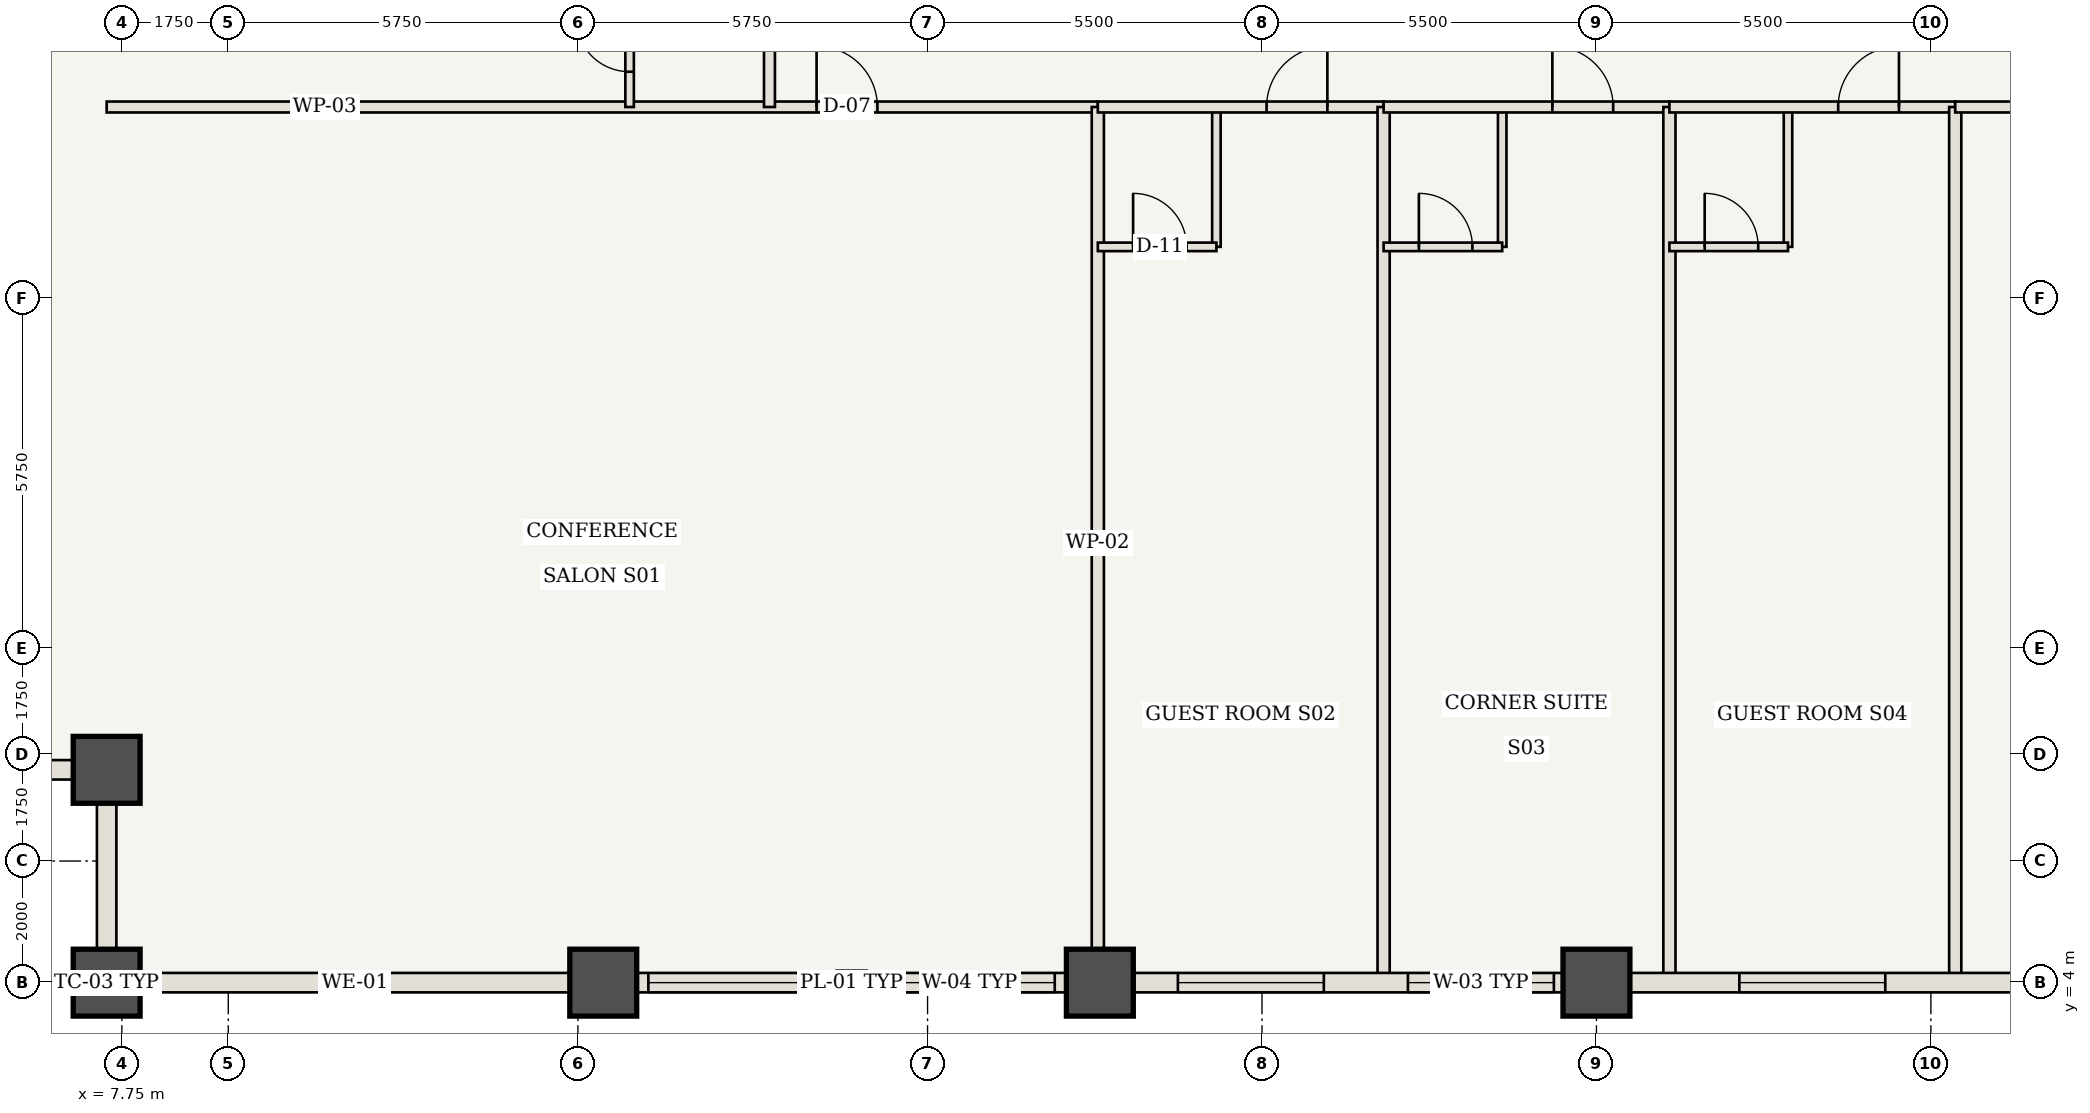
"""IFC4 building model, lengths in metres.
Left out: names, types, materials, properties, quantities, classifications, styles, units other than length and angle.
Written with IfcOpenShell. Run it as: python <this file> out.ifc"""

import sys

from ifc_helpers import new_model, si_unit, direction, frame, frame_2d, origin, origin_2d, place, context, subcontext, project, spatial, rectangle, extrude, element, fill, save


model = new_model("IFC4")
c1 = context("Model", 3, precision=1e-05, world=origin(), true_north=direction((0.0, 1.0)))
c2 = subcontext(c1, "Body", "Model", "MODEL_VIEW")
j1 = project(units=[si_unit("LENGTHUNIT", "METRE"), si_unit("PLANEANGLEUNIT", "RADIAN")], contexts=[c1])
p1 = place(None, origin())
s1 = spatial("IfcSite", under=j1, at=p1, CompositionType="ELEMENT")
p2 = place(p1, origin())
s2 = spatial("IfcBuilding", under=s1, at=p2, CompositionType="ELEMENT")
p3 = place(p2, frame((0.0, 0.0, 45.85)))
s3 = spatial("IfcBuildingStorey", under=s2, at=p3, CompositionType="ELEMENT", Elevation=45.85)
for number, where, z_axis, x_axis in (
    (1, (7.5, 4.0, 0.0), (0.0, 0.0, 1.0), (1.0, 0.0, 0.0)),
    (2, (7.5, 7.5, 0.0), (0.0, 0.0, 1.0), (1.0, 0.0, 0.0)),
    (3, (15.667, 4.0, 0.0), (0.0, 0.0, 1.0), (1.0, 0.0, 0.0)),
    (4, (23.833, 4.0, 0.0), (0.0, 0.0, 1.0), (1.0, 0.0, 0.0)),
    (5, (32.0, 4.0, 0.0), (0.0, 0.0, 1.0), (1.0, 0.0, 0.0)),
):
    element("IfcColumn", number, at=place(p3, frame(where, z_axis=z_axis, x_axis=x_axis)), inside=s3, PredefinedType="COLUMN", context=c2, shape_type="SweptSolid", body=[
        extrude(rectangle(XDim=1.1, YDim=1.1, at=origin_2d()), origin(), (0.0, 0.0, 1.0), 3.5),
    ])
p4 = place(p3, frame((7.5, 18.4, 0.0), z_axis=(0.0, 0.0, 1.0), x_axis=(1.0, 0.0, 0.0)))
e6 = element("IfcWall", 6, at=p4, inside=s3, PredefinedType="STANDARD", context=c2, shape_type="SweptSolid", body=[
    extrude(rectangle(XDim=16.3, YDim=0.18, at=frame_2d((8.15, 0.0))), origin(), (0.0, 0.0, 1.0), 3.32),
])
p5 = place(p4, frame((11.675, 0.0, 0.0)))
e7 = element("IfcOpeningElement", 7, at=p5, cuts=e6, PredefinedType="OPENING", context=c2, shape_type="SweptSolid", body=[
    extrude(rectangle(XDim=1.0, YDim=2.15, at=frame_2d((0.5, 1.075))), frame((0.0, 0.1, 0.0), z_axis=(0.0, -1.0, 0.0), x_axis=(1.0, 0.0, 0.0)), (0.0, 0.0, 1.0), 0.2),
])
p6 = place(p3, frame((23.8, 4.06, 0.0), z_axis=(0.0, 0.0, 1.0), x_axis=(0.0, 1.0, 0.0)))
e8 = element("IfcWall", 8, at=p6, inside=s3, PredefinedType="STANDARD", context=c2, shape_type="SweptSolid", body=[
    extrude(rectangle(XDim=14.34, YDim=0.2, at=frame_2d((7.17, 0.0))), origin(), (0.0, 0.0, 1.0), 3.32),
])
p7 = place(p3, frame((25.75, 16.1, 0.0), z_axis=(0.0, 0.0, 1.0), x_axis=(0.0, 1.0, 0.0)))
e9 = element("IfcWall", 9, at=p7, inside=s3, PredefinedType="STANDARD", context=c2, shape_type="SweptSolid", body=[
    extrude(rectangle(XDim=2.3, YDim=0.14, at=frame_2d((1.15, 0.0))), origin(), (0.0, 0.0, 1.0), 3.32),
])
p8 = place(p3, frame((23.8, 16.1, 0.0), z_axis=(0.0, 0.0, 1.0), x_axis=(1.0, 0.0, 0.0)))
e10 = element("IfcWall", 10, at=p8, inside=s3, PredefinedType="STANDARD", context=c2, shape_type="SweptSolid", body=[
    extrude(rectangle(XDim=1.95, YDim=0.14, at=frame_2d((0.975, 0.0))), origin(), (0.0, 0.0, 1.0), 3.32),
])
p9 = place(p8, frame((0.58, 0.0, 0.0)))
e11 = element("IfcOpeningElement", 11, at=p9, cuts=e10, PredefinedType="OPENING", context=c2, shape_type="SweptSolid", body=[
    extrude(rectangle(XDim=0.88, YDim=2.1, at=frame_2d((0.44, 1.05))), frame((0.0, 0.08, 0.0), z_axis=(0.0, -1.0, 0.0), x_axis=(1.0, 0.0, 0.0)), (0.0, 0.0, 1.0), 0.16),
])
p10 = place(p3, frame((23.8, 18.4, 0.0), z_axis=(0.0, 0.0, 1.0), x_axis=(1.0, 0.0, 0.0)))
e12 = element("IfcWall", 12, at=p10, inside=s3, PredefinedType="STANDARD", context=c2, shape_type="SweptSolid", body=[
    extrude(rectangle(XDim=4.7, YDim=0.18, at=frame_2d((2.35, 0.0))), origin(), (0.0, 0.0, 1.0), 3.32),
])
p11 = place(p10, frame((2.775, 0.0, 0.0)))
e13 = element("IfcOpeningElement", 13, at=p11, cuts=e12, PredefinedType="OPENING", context=c2, shape_type="SweptSolid", body=[
    extrude(rectangle(XDim=1.0, YDim=2.15, at=frame_2d((0.5, 1.075))), frame((0.0, 0.1, 0.0), z_axis=(0.0, -1.0, 0.0), x_axis=(1.0, 0.0, 0.0)), (0.0, 0.0, 1.0), 0.2),
])
p12 = place(p3, frame((28.5, 4.06, 0.0), z_axis=(0.0, 0.0, 1.0), x_axis=(0.0, 1.0, 0.0)))
e14 = element("IfcWall", 14, at=p12, inside=s3, PredefinedType="STANDARD", context=c2, shape_type="SweptSolid", body=[
    extrude(rectangle(XDim=14.34, YDim=0.2, at=frame_2d((7.17, 0.0))), origin(), (0.0, 0.0, 1.0), 3.32),
])
p13 = place(p3, frame((30.45, 16.1, 0.0), z_axis=(0.0, 0.0, 1.0), x_axis=(0.0, 1.0, 0.0)))
e15 = element("IfcWall", 15, at=p13, inside=s3, PredefinedType="STANDARD", context=c2, shape_type="SweptSolid", body=[
    extrude(rectangle(XDim=2.3, YDim=0.14, at=frame_2d((1.15, 0.0))), origin(), (0.0, 0.0, 1.0), 3.32),
])
p14 = place(p3, frame((28.5, 16.1, 0.0), z_axis=(0.0, 0.0, 1.0), x_axis=(1.0, 0.0, 0.0)))
e16 = element("IfcWall", 16, at=p14, inside=s3, PredefinedType="STANDARD", context=c2, shape_type="SweptSolid", body=[
    extrude(rectangle(XDim=1.95, YDim=0.14, at=frame_2d((0.975, 0.0))), origin(), (0.0, 0.0, 1.0), 3.32),
])
p15 = place(p14, frame((0.58, 0.0, 0.0)))
e17 = element("IfcOpeningElement", 17, at=p15, cuts=e16, PredefinedType="OPENING", context=c2, shape_type="SweptSolid", body=[
    extrude(rectangle(XDim=0.88, YDim=2.1, at=frame_2d((0.44, 1.05))), frame((0.0, 0.08, 0.0), z_axis=(0.0, -1.0, 0.0), x_axis=(1.0, 0.0, 0.0)), (0.0, 0.0, 1.0), 0.16),
])
p16 = place(p3, frame((28.5, 18.4, 0.0), z_axis=(0.0, 0.0, 1.0), x_axis=(1.0, 0.0, 0.0)))
e18 = element("IfcWall", 18, at=p16, inside=s3, PredefinedType="STANDARD", context=c2, shape_type="SweptSolid", body=[
    extrude(rectangle(XDim=4.7, YDim=0.18, at=frame_2d((2.35, 0.0))), origin(), (0.0, 0.0, 1.0), 3.32),
])
p17 = place(p16, frame((2.775, 0.0, 0.0)))
e19 = element("IfcOpeningElement", 19, at=p17, cuts=e18, PredefinedType="OPENING", context=c2, shape_type="SweptSolid", body=[
    extrude(rectangle(XDim=1.0, YDim=2.15, at=frame_2d((0.5, 1.075))), frame((0.0, 0.1, 0.0), z_axis=(0.0, -1.0, 0.0), x_axis=(1.0, 0.0, 0.0)), (0.0, 0.0, 1.0), 0.2),
])
p18 = place(p3, frame((33.2, 4.06, 0.0), z_axis=(0.0, 0.0, 1.0), x_axis=(0.0, 1.0, 0.0)))
e20 = element("IfcWall", 20, at=p18, inside=s3, PredefinedType="STANDARD", context=c2, shape_type="SweptSolid", body=[
    extrude(rectangle(XDim=14.34, YDim=0.2, at=frame_2d((7.17, 0.0))), origin(), (0.0, 0.0, 1.0), 3.32),
])
p19 = place(p3, frame((35.15, 16.1, 0.0), z_axis=(0.0, 0.0, 1.0), x_axis=(0.0, 1.0, 0.0)))
e21 = element("IfcWall", 21, at=p19, inside=s3, PredefinedType="STANDARD", context=c2, shape_type="SweptSolid", body=[
    extrude(rectangle(XDim=2.3, YDim=0.14, at=frame_2d((1.15, 0.0))), origin(), (0.0, 0.0, 1.0), 3.32),
])
p20 = place(p3, frame((33.2, 16.1, 0.0), z_axis=(0.0, 0.0, 1.0), x_axis=(1.0, 0.0, 0.0)))
e22 = element("IfcWall", 22, at=p20, inside=s3, PredefinedType="STANDARD", context=c2, shape_type="SweptSolid", body=[
    extrude(rectangle(XDim=1.95, YDim=0.14, at=frame_2d((0.975, 0.0))), origin(), (0.0, 0.0, 1.0), 3.32),
])
p21 = place(p20, frame((0.58, 0.0, 0.0)))
e23 = element("IfcOpeningElement", 23, at=p21, cuts=e22, PredefinedType="OPENING", context=c2, shape_type="SweptSolid", body=[
    extrude(rectangle(XDim=0.88, YDim=2.1, at=frame_2d((0.44, 1.05))), frame((0.0, 0.08, 0.0), z_axis=(0.0, -1.0, 0.0), x_axis=(1.0, 0.0, 0.0)), (0.0, 0.0, 1.0), 0.16),
])
p22 = place(p3, frame((33.2, 18.4, 0.0), z_axis=(0.0, 0.0, 1.0), x_axis=(1.0, 0.0, 0.0)))
e24 = element("IfcWall", 24, at=p22, inside=s3, PredefinedType="STANDARD", context=c2, shape_type="SweptSolid", body=[
    extrude(rectangle(XDim=4.7, YDim=0.18, at=frame_2d((2.35, 0.0))), origin(), (0.0, 0.0, 1.0), 3.32),
])
p23 = place(p22, frame((2.775, 0.0, 0.0)))
e25 = element("IfcOpeningElement", 25, at=p23, cuts=e24, PredefinedType="OPENING", context=c2, shape_type="SweptSolid", body=[
    extrude(rectangle(XDim=1.0, YDim=2.15, at=frame_2d((0.5, 1.075))), frame((0.0, 0.1, 0.0), z_axis=(0.0, -1.0, 0.0), x_axis=(1.0, 0.0, 0.0)), (0.0, 0.0, 1.0), 0.2),
])
p24 = place(p3, frame((37.9, 4.06, 0.0), z_axis=(0.0, 0.0, 1.0), x_axis=(0.0, 1.0, 0.0)))
e26 = element("IfcWall", 26, at=p24, inside=s3, PredefinedType="STANDARD", context=c2, shape_type="SweptSolid", body=[
    extrude(rectangle(XDim=14.34, YDim=0.2, at=frame_2d((7.17, 0.0))), origin(), (0.0, 0.0, 1.0), 3.32),
])
p25 = place(p3, frame((37.9, 18.4, 0.0), z_axis=(0.0, 0.0, 1.0), x_axis=(1.0, 0.0, 0.0)))
e27 = element("IfcWall", 27, at=p25, inside=s3, PredefinedType="STANDARD", context=c2, shape_type="SweptSolid", body=[
    extrude(rectangle(XDim=18.6, YDim=0.18, at=frame_2d((9.3, 0.0))), origin(), (0.0, 0.0, 1.0), 3.32),
])
p26 = place(p25, frame((4.775, 0.0, 0.0)))
e28 = element("IfcOpeningElement", 28, at=p26, cuts=e27, PredefinedType="OPENING", context=c2, shape_type="SweptSolid", body=[
    extrude(rectangle(XDim=1.0, YDim=2.15, at=frame_2d((0.5, 1.075))), frame((0.0, 0.1, 0.0), z_axis=(0.0, -1.0, 0.0), x_axis=(1.0, 0.0, 0.0)), (0.0, 0.0, 1.0), 0.2),
])
p27 = place(p3, frame((16.1, 18.4, 0.0), z_axis=(0.0, 0.0, 1.0), x_axis=(0.0, 1.0, 0.0)))
e29 = element("IfcWall", 29, at=p27, inside=s3, PredefinedType="STANDARD", context=c2, shape_type="SweptSolid", body=[
    extrude(rectangle(XDim=1.95, YDim=0.14, at=frame_2d((0.975, 0.0))), origin(), (0.0, 0.0, 1.0), 3.32),
])
p28 = place(p27, frame((0.58, 0.0, 0.0)))
e30 = element("IfcOpeningElement", 30, at=p28, cuts=e29, PredefinedType="OPENING", context=c2, shape_type="SweptSolid", body=[
    extrude(rectangle(XDim=0.88, YDim=2.1, at=frame_2d((0.44, 1.05))), frame((0.0, 0.08, 0.0), z_axis=(0.0, -1.0, 0.0), x_axis=(1.0, 0.0, 0.0)), (0.0, 0.0, 1.0), 0.16),
])
p29 = place(p3, frame((18.4, 18.4, 0.0), z_axis=(0.0, 0.0, 1.0), x_axis=(0.0, 1.0, 0.0)))
e31 = element("IfcWall", 31, at=p29, inside=s3, PredefinedType="STANDARD", context=c2, shape_type="SweptSolid", body=[
    extrude(rectangle(XDim=4.8, YDim=0.18, at=frame_2d((2.4, 0.0))), origin(), (0.0, 0.0, 1.0), 3.32),
])
p30 = place(p29, frame((2.825, 0.0, 0.0)))
e32 = element("IfcOpeningElement", 32, at=p30, cuts=e31, PredefinedType="OPENING", context=c2, shape_type="SweptSolid", body=[
    extrude(rectangle(XDim=1.0, YDim=2.15, at=frame_2d((0.5, 1.075))), frame((0.0, 0.1, 0.0), z_axis=(0.0, -1.0, 0.0), x_axis=(1.0, 0.0, 0.0)), (0.0, 0.0, 1.0), 0.2),
])
p31 = place(p3, frame((15.667, 4.0, 0.0), z_axis=(0.0, 0.0, 1.0), x_axis=(-1.0, 0.0, 0.0)))
e33 = element("IfcWall", 33, at=p31, inside=s3, PredefinedType="USERDEFINED", context=c2, shape_type="SweptSolid", body=[
    extrude(rectangle(XDim=8.167, YDim=0.32, at=frame_2d((4.083, 0.0))), origin(), (0.0, 0.0, 1.0), 2.52),
])
p32 = place(p3, frame((23.833, 4.0, 0.0), z_axis=(0.0, 0.0, 1.0), x_axis=(-1.0, 0.0, 0.0)))
e34 = element("IfcWall", 34, at=p32, inside=s3, PredefinedType="USERDEFINED", context=c2, shape_type="SweptSolid", body=[
    extrude(rectangle(XDim=8.167, YDim=0.32, at=frame_2d((4.083, 0.0))), origin(), (0.0, 0.0, 1.0), 2.52),
])
p33 = place(p32, frame((0.742, 0.0, 0.85)))
e35 = element("IfcOpeningElement", 35, at=p33, cuts=e34, PredefinedType="OPENING", context=c2, shape_type="SweptSolid", body=[
    extrude(rectangle(XDim=2.8, YDim=1.47, at=frame_2d((1.4, 0.735))), frame((0.0, 0.17, 0.0), z_axis=(0.0, -1.0, 0.0), x_axis=(1.0, 0.0, 0.0)), (0.0, 0.0, 1.0), 0.34),
])
p34 = place(p32, frame((4.625, 0.0, 0.85)))
e36 = element("IfcOpeningElement", 36, at=p34, cuts=e34, PredefinedType="OPENING", context=c2, shape_type="SweptSolid", body=[
    extrude(rectangle(XDim=2.8, YDim=1.47, at=frame_2d((1.4, 0.735))), frame((0.0, 0.17, 0.0), z_axis=(0.0, -1.0, 0.0), x_axis=(1.0, 0.0, 0.0)), (0.0, 0.0, 1.0), 0.34),
])
p35 = place(p3, frame((32.0, 4.0, 0.0), z_axis=(0.0, 0.0, 1.0), x_axis=(-1.0, 0.0, 0.0)))
e37 = element("IfcWall", 37, at=p35, inside=s3, PredefinedType="USERDEFINED", context=c2, shape_type="SweptSolid", body=[
    extrude(rectangle(XDim=8.167, YDim=0.32, at=frame_2d((4.083, 0.0))), origin(), (0.0, 0.0, 1.0), 2.52),
])
p36 = place(p35, frame((0.7, 0.0, 0.85)))
e38 = element("IfcOpeningElement", 38, at=p36, cuts=e37, PredefinedType="OPENING", context=c2, shape_type="SweptSolid", body=[
    extrude(rectangle(XDim=2.4, YDim=1.47, at=frame_2d((1.2, 0.735))), frame((0.0, 0.17, 0.0), z_axis=(0.0, -1.0, 0.0), x_axis=(1.0, 0.0, 0.0)), (0.0, 0.0, 1.0), 0.34),
])
p37 = place(p35, frame((4.483, 0.0, 0.85)))
e39 = element("IfcOpeningElement", 39, at=p37, cuts=e37, PredefinedType="OPENING", context=c2, shape_type="SweptSolid", body=[
    extrude(rectangle(XDim=2.4, YDim=1.47, at=frame_2d((1.2, 0.735))), frame((0.0, 0.17, 0.0), z_axis=(0.0, -1.0, 0.0), x_axis=(1.0, 0.0, 0.0)), (0.0, 0.0, 1.0), 0.34),
])
p38 = place(p3, frame((40.167, 4.0, 0.0), z_axis=(0.0, 0.0, 1.0), x_axis=(-1.0, 0.0, 0.0)))
e40 = element("IfcWall", 40, at=p38, inside=s3, PredefinedType="USERDEFINED", context=c2, shape_type="SweptSolid", body=[
    extrude(rectangle(XDim=8.167, YDim=0.32, at=frame_2d((4.083, 0.0))), origin(), (0.0, 0.0, 1.0), 2.52),
])
p39 = place(p38, frame((3.417, 0.0, 0.85)))
e41 = element("IfcOpeningElement", 41, at=p39, cuts=e40, PredefinedType="OPENING", context=c2, shape_type="SweptSolid", body=[
    extrude(rectangle(XDim=2.4, YDim=1.47, at=frame_2d((1.2, 0.735))), frame((0.0, 0.17, 0.0), z_axis=(0.0, -1.0, 0.0), x_axis=(1.0, 0.0, 0.0)), (0.0, 0.0, 1.0), 0.34),
])
for number, where, z_axis, x_axis in (
    (42, (7.5, 4.0, 0.0), (0.0, 0.0, 1.0), (0.0, 1.0, 0.0)),
    (43, (7.5, 7.5, 0.0), (0.0, 0.0, 1.0), (-1.0, 0.0, 0.0)),
):
    element("IfcWall", number, at=place(p3, frame(where, z_axis=z_axis, x_axis=x_axis)), inside=s3, PredefinedType="USERDEFINED", context=c2, shape_type="SweptSolid", body=[
        extrude(rectangle(XDim=3.5, YDim=0.32, at=frame_2d((1.75, 0.0))), origin(), (0.0, 0.0, 1.0), 2.52),
    ])
p40 = place(p5, origin())
e44 = element("IfcDoor", 44, at=p40, inside=s3, OperationType="SINGLE_SWING_LEFT", PredefinedType="DOOR", context=c2, shape_type="SweptSolid", body=[
    extrude(rectangle(XDim=1.0, YDim=2.15, at=frame_2d((0.5, 1.075))), frame((0.0, 0.025, 0.0), z_axis=(0.0, -1.0, 0.0), x_axis=(1.0, 0.0, 0.0)), (0.0, 0.0, 1.0), 0.05),
])
fill(e7, e44)
p41 = place(p9, origin())
e45 = element("IfcDoor", 45, at=p41, inside=s3, OperationType="SINGLE_SWING_LEFT", PredefinedType="DOOR", context=c2, shape_type="SweptSolid", body=[
    extrude(rectangle(XDim=0.88, YDim=2.1, at=frame_2d((0.44, 1.05))), frame((0.0, 0.025, 0.0), z_axis=(0.0, -1.0, 0.0), x_axis=(1.0, 0.0, 0.0)), (0.0, 0.0, 1.0), 0.05),
])
fill(e11, e45)
p42 = place(p11, origin())
e46 = element("IfcDoor", 46, at=p42, inside=s3, OperationType="SINGLE_SWING_RIGHT", PredefinedType="DOOR", context=c2, shape_type="SweptSolid", body=[
    extrude(rectangle(XDim=1.0, YDim=2.15, at=frame_2d((0.5, 1.075))), frame((0.0, 0.025, 0.0), z_axis=(0.0, -1.0, 0.0), x_axis=(1.0, 0.0, 0.0)), (0.0, 0.0, 1.0), 0.05),
])
fill(e13, e46)
p43 = place(p15, origin())
e47 = element("IfcDoor", 47, at=p43, inside=s3, OperationType="SINGLE_SWING_LEFT", PredefinedType="DOOR", context=c2, shape_type="SweptSolid", body=[
    extrude(rectangle(XDim=0.88, YDim=2.1, at=frame_2d((0.44, 1.05))), frame((0.0, 0.025, 0.0), z_axis=(0.0, -1.0, 0.0), x_axis=(1.0, 0.0, 0.0)), (0.0, 0.0, 1.0), 0.05),
])
fill(e17, e47)
p44 = place(p17, origin())
e48 = element("IfcDoor", 48, at=p44, inside=s3, OperationType="SINGLE_SWING_LEFT", PredefinedType="DOOR", context=c2, shape_type="SweptSolid", body=[
    extrude(rectangle(XDim=1.0, YDim=2.15, at=frame_2d((0.5, 1.075))), frame((0.0, 0.025, 0.0), z_axis=(0.0, -1.0, 0.0), x_axis=(1.0, 0.0, 0.0)), (0.0, 0.0, 1.0), 0.05),
])
fill(e19, e48)
p45 = place(p21, origin())
e49 = element("IfcDoor", 49, at=p45, inside=s3, OperationType="SINGLE_SWING_LEFT", PredefinedType="DOOR", context=c2, shape_type="SweptSolid", body=[
    extrude(rectangle(XDim=0.88, YDim=2.1, at=frame_2d((0.44, 1.05))), frame((0.0, 0.025, 0.0), z_axis=(0.0, -1.0, 0.0), x_axis=(1.0, 0.0, 0.0)), (0.0, 0.0, 1.0), 0.05),
])
fill(e23, e49)
p46 = place(p23, origin())
e50 = element("IfcDoor", 50, at=p46, inside=s3, OperationType="SINGLE_SWING_RIGHT", PredefinedType="DOOR", context=c2, shape_type="SweptSolid", body=[
    extrude(rectangle(XDim=1.0, YDim=2.15, at=frame_2d((0.5, 1.075))), frame((0.0, 0.025, 0.0), z_axis=(0.0, -1.0, 0.0), x_axis=(1.0, 0.0, 0.0)), (0.0, 0.0, 1.0), 0.05),
])
fill(e25, e50)
p47 = place(p28, origin())
e51 = element("IfcDoor", 51, at=p47, inside=s3, OperationType="SINGLE_SWING_RIGHT", PredefinedType="DOOR", context=c2, shape_type="SweptSolid", body=[
    extrude(rectangle(XDim=0.88, YDim=2.1, at=frame_2d((0.44, 1.05))), frame((0.0, 0.025, 0.0), z_axis=(0.0, -1.0, 0.0), x_axis=(1.0, 0.0, 0.0)), (0.0, 0.0, 1.0), 0.05),
])
fill(e30, e51)
p48 = place(p33, origin())
e52 = element("IfcWindow", 52, at=p48, inside=s3, PartitioningType="SINGLE_PANEL", PredefinedType="WINDOW", context=c2, shape_type="SweptSolid", body=[
    extrude(rectangle(XDim=2.8, YDim=1.47, at=frame_2d((1.4, 0.735))), frame((0.0, 0.03, 0.0), z_axis=(0.0, -1.0, 0.0), x_axis=(1.0, 0.0, 0.0)), (0.0, 0.0, 1.0), 0.06),
])
fill(e35, e52)
p49 = place(p34, origin())
e53 = element("IfcWindow", 53, at=p49, inside=s3, PartitioningType="SINGLE_PANEL", PredefinedType="WINDOW", context=c2, shape_type="SweptSolid", body=[
    extrude(rectangle(XDim=2.8, YDim=1.47, at=frame_2d((1.4, 0.735))), frame((0.0, 0.03, 0.0), z_axis=(0.0, -1.0, 0.0), x_axis=(1.0, 0.0, 0.0)), (0.0, 0.0, 1.0), 0.06),
])
fill(e36, e53)
p50 = place(p36, origin())
e54 = element("IfcWindow", 54, at=p50, inside=s3, PartitioningType="SINGLE_PANEL", PredefinedType="WINDOW", context=c2, shape_type="SweptSolid", body=[
    extrude(rectangle(XDim=2.4, YDim=1.47, at=frame_2d((1.2, 0.735))), frame((0.0, 0.03, 0.0), z_axis=(0.0, -1.0, 0.0), x_axis=(1.0, 0.0, 0.0)), (0.0, 0.0, 1.0), 0.06),
])
fill(e38, e54)
p51 = place(p37, origin())
e55 = element("IfcWindow", 55, at=p51, inside=s3, PartitioningType="SINGLE_PANEL", PredefinedType="WINDOW", context=c2, shape_type="SweptSolid", body=[
    extrude(rectangle(XDim=2.4, YDim=1.47, at=frame_2d((1.2, 0.735))), frame((0.0, 0.03, 0.0), z_axis=(0.0, -1.0, 0.0), x_axis=(1.0, 0.0, 0.0)), (0.0, 0.0, 1.0), 0.06),
])
fill(e39, e55)
p52 = place(p39, origin())
e56 = element("IfcWindow", 56, at=p52, inside=s3, PartitioningType="SINGLE_PANEL", PredefinedType="WINDOW", context=c2, shape_type="SweptSolid", body=[
    extrude(rectangle(XDim=2.4, YDim=1.47, at=frame_2d((1.2, 0.735))), frame((0.0, 0.03, 0.0), z_axis=(0.0, -1.0, 0.0), x_axis=(1.0, 0.0, 0.0)), (0.0, 0.0, 1.0), 0.06),
])
fill(e41, e56)
save(model, sys.argv[1])
